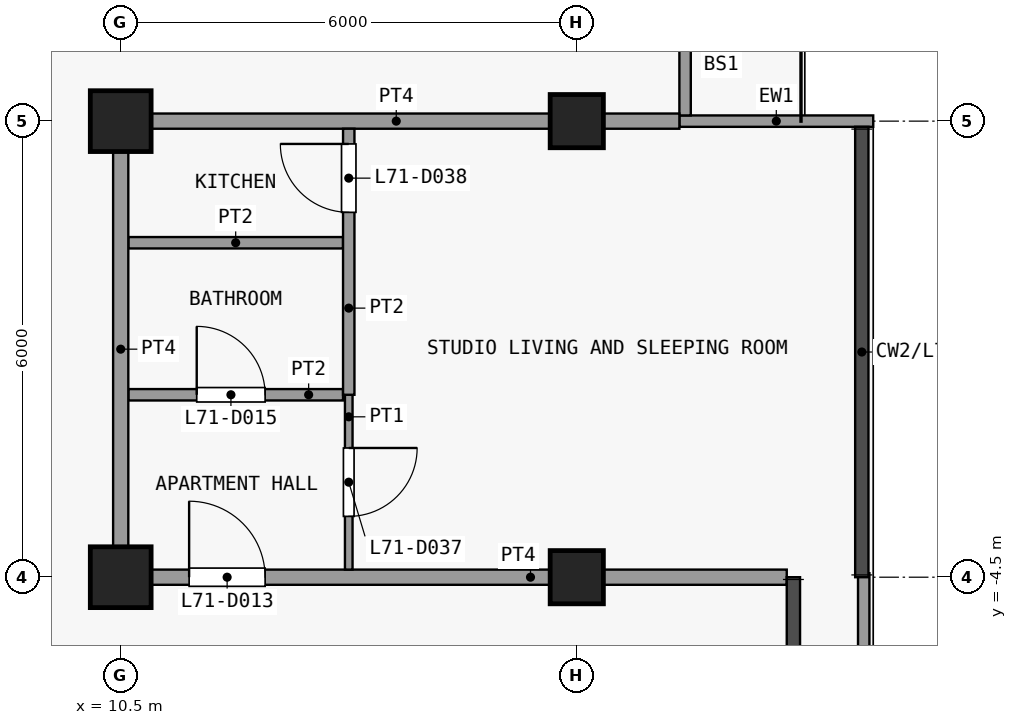
"""IFC4 building model, lengths in metres.
Left out: names, types, materials, properties, quantities, classifications, styles, units other than length and angle.
Written with IfcOpenShell. Run it as: python <this file> out.ifc"""

import sys

from ifc_helpers import new_model, si_unit, direction, frame, frame_2d, origin, origin_2d, place, context, subcontext, project, spatial, rectangle, extrude, element, fill, save


model = new_model("IFC4")
c1 = context("Model", 3, precision=1e-05, world=origin(), true_north=direction((0.0, 1.0)))
c2 = subcontext(c1, "Body", "Model", "MODEL_VIEW")
j1 = project(units=[si_unit("LENGTHUNIT", "METRE"), si_unit("PLANEANGLEUNIT", "RADIAN")], contexts=[c1])
p1 = place(None, origin())
s1 = spatial("IfcSite", under=j1, at=p1, CompositionType="ELEMENT")
p2 = place(p1, origin())
s2 = spatial("IfcBuilding", under=s1, at=p2, CompositionType="ELEMENT")
p3 = place(p2, frame((0.0, 0.0, 280.7)))
s3 = spatial("IfcBuildingStorey", under=s2, at=p3, CompositionType="ELEMENT", Elevation=280.7)
for number, where, z_axis, x_axis in (
    (1, (10.5, -4.5, 0.0), (0.0, 0.0, 1.0), (1.0, 0.0, 0.0)),
    (2, (10.5, 1.5, 0.0), (0.0, 0.0, 1.0), (1.0, 0.0, 0.0)),
):
    element("IfcColumn", number, at=place(p3, frame(where, z_axis=z_axis, x_axis=x_axis)), inside=s3, PredefinedType="COLUMN", context=c2, shape_type="SweptSolid", body=[
        extrude(rectangle(XDim=0.8, YDim=0.8, at=origin_2d()), origin(), (0.0, 0.0, 1.0), 3.6),
    ])
for number, where, z_axis, x_axis in (
    (3, (16.5, -4.5, 0.0), (0.0, 0.0, 1.0), (1.0, 0.0, 0.0)),
    (4, (16.5, 1.5, 0.0), (0.0, 0.0, 1.0), (1.0, 0.0, 0.0)),
):
    element("IfcColumn", number, at=place(p3, frame(where, z_axis=z_axis, x_axis=x_axis)), inside=s3, PredefinedType="COLUMN", context=c2, shape_type="SweptSolid", body=[
        extrude(rectangle(XDim=0.7, YDim=0.7, at=origin_2d()), origin(), (0.0, 0.0, 1.0), 3.6),
    ])
p4 = place(p3, frame((17.85, 1.5, 0.0), z_axis=(0.0, 0.0, 1.0), x_axis=(1.0, 0.0, 0.0)))
e5 = element("IfcWall", 5, at=p4, inside=s3, PredefinedType="SOLIDWALL", context=c2, shape_type="SweptSolid", body=[
    extrude(rectangle(XDim=2.55, YDim=0.15, at=frame_2d((1.275, 0.0))), origin(), (0.0, 0.0, 1.0), 3.3),
])
p5 = place(p3, frame((17.925, 7.425, 0.0), z_axis=(0.0, 0.0, 1.0), x_axis=(0.0, -1.0, 0.0)))
e6 = element("IfcWall", 6, at=p5, inside=s3, PredefinedType="SOLIDWALL", context=c2, shape_type="SweptSolid", body=[
    extrude(rectangle(XDim=5.85, YDim=0.15, at=frame_2d((2.925, 0.0))), origin(), (0.0, 0.0, 1.0), 3.3),
])
p6 = place(p5, frame((1.15, 0.0, 0.0)))
e7 = element("IfcOpeningElement", 7, at=p6, cuts=e6, PredefinedType="OPENING", context=c2, shape_type="SweptSolid", body=[
    extrude(rectangle(XDim=1.2, YDim=2.4, at=frame_2d((0.6, 1.2))), frame((0.0, 0.085, 0.0), z_axis=(0.0, -1.0, 0.0), x_axis=(1.0, 0.0, 0.0)), (0.0, 0.0, 1.0), 0.17),
])
p7 = place(p5, frame((3.2, 0.0, 0.9)))
e8 = element("IfcOpeningElement", 8, at=p7, cuts=e6, PredefinedType="OPENING", context=c2, shape_type="SweptSolid", body=[
    extrude(rectangle(XDim=1.8, YDim=2.1, at=frame_2d((0.9, 1.05))), frame((0.0, 0.085, 0.0), z_axis=(0.0, -1.0, 0.0), x_axis=(1.0, 0.0, 0.0)), (0.0, 0.0, 1.0), 0.17),
])
p8 = place(p3, frame((20.275, -4.448, 0.0), z_axis=(0.0, 0.0, 1.0), x_axis=(0.0, -1.0, 0.0)))
e9 = element("IfcWall", 9, at=p8, inside=s3, PredefinedType="PARAPET", context=c2, shape_type="SweptSolid", body=[
    extrude(rectangle(XDim=9.002, YDim=0.15, at=frame_2d((4.501, 0.0))), origin(), (0.0, 0.0, 1.0), 1.15),
])
p9 = place(p3, frame((10.4, -4.5, 0.0), z_axis=(0.0, 0.0, 1.0), x_axis=(1.0, 0.0, 0.0)))
e10 = element("IfcWall", 10, at=p9, inside=s3, PredefinedType="PARTITIONING", context=c2, shape_type="SweptSolid", body=[
    extrude(rectangle(XDim=8.863, YDim=0.2, at=frame_2d((4.431, 0.0))), origin(), (0.0, 0.0, 1.0), 3.3),
])
p10 = place(p9, frame((1.0, 0.0, 0.0)))
e11 = element("IfcOpeningElement", 11, at=p10, cuts=e10, PredefinedType="OPENING", context=c2, shape_type="SweptSolid", body=[
    extrude(rectangle(XDim=1.0, YDim=2.1, at=frame_2d((0.5, 1.05))), frame((0.0, 0.11, 0.0), z_axis=(0.0, -1.0, 0.0), x_axis=(1.0, 0.0, 0.0)), (0.0, 0.0, 1.0), 0.22),
])
p11 = place(p3, frame((10.6, -2.1, 0.0), z_axis=(0.0, 0.0, 1.0), x_axis=(1.0, 0.0, 0.0)))
e12 = element("IfcWall", 12, at=p11, inside=s3, PredefinedType="PARTITIONING", context=c2, shape_type="SweptSolid", body=[
    extrude(rectangle(XDim=2.825, YDim=0.15, at=frame_2d((1.413, 0.0))), origin(), (0.0, 0.0, 1.0), 3.3),
])
p12 = place(p11, frame((0.9, 0.0, 0.0)))
e13 = element("IfcOpeningElement", 13, at=p12, cuts=e12, PredefinedType="OPENING", context=c2, shape_type="SweptSolid", body=[
    extrude(rectangle(XDim=0.9, YDim=2.1, at=frame_2d((0.45, 1.05))), frame((0.0, 0.085, 0.0), z_axis=(0.0, -1.0, 0.0), x_axis=(1.0, 0.0, 0.0)), (0.0, 0.0, 1.0), 0.17),
])
p13 = place(p3, frame((10.6, -0.1, 0.0), z_axis=(0.0, 0.0, 1.0), x_axis=(1.0, 0.0, 0.0)))
e14 = element("IfcWall", 14, at=p13, inside=s3, PredefinedType="PARTITIONING", context=c2, shape_type="SweptSolid", body=[
    extrude(rectangle(XDim=2.825, YDim=0.15, at=frame_2d((1.413, 0.0))), origin(), (0.0, 0.0, 1.0), 3.3),
])
p14 = place(p3, frame((10.4, 1.5, 0.0), z_axis=(0.0, 0.0, 1.0), x_axis=(1.0, 0.0, 0.0)))
e15 = element("IfcWall", 15, at=p14, inside=s3, PredefinedType="PARTITIONING", context=c2, shape_type="SweptSolid", body=[
    extrude(rectangle(XDim=7.45, YDim=0.2, at=frame_2d((3.725, 0.0))), origin(), (0.0, 0.0, 1.0), 3.3),
])
p15 = place(p3, frame((10.5, -4.4, 0.0), z_axis=(0.0, 0.0, 1.0), x_axis=(0.0, 1.0, 0.0)))
e16 = element("IfcWall", 16, at=p15, inside=s3, PredefinedType="PARTITIONING", context=c2, shape_type="SweptSolid", body=[
    extrude(rectangle(XDim=5.8, YDim=0.2, at=frame_2d((2.9, 0.0))), origin(), (0.0, 0.0, 1.0), 3.3),
])
p16 = place(p3, frame((13.5, -4.4, 0.0), z_axis=(0.0, 0.0, 1.0), x_axis=(0.0, 1.0, 0.0)))
e17 = element("IfcWall", 17, at=p16, inside=s3, PredefinedType="PARTITIONING", context=c2, shape_type="SweptSolid", body=[
    extrude(rectangle(XDim=2.3, YDim=0.1, at=frame_2d((1.15, 0.0))), origin(), (0.0, 0.0, 1.0), 3.3),
])
p17 = place(p16, frame((0.7, 0.0, 0.0)))
e18 = element("IfcOpeningElement", 18, at=p17, cuts=e17, PredefinedType="OPENING", context=c2, shape_type="SweptSolid", body=[
    extrude(rectangle(XDim=0.9, YDim=2.1, at=frame_2d((0.45, 1.05))), frame((0.0, 0.06, 0.0), z_axis=(0.0, -1.0, 0.0), x_axis=(1.0, 0.0, 0.0)), (0.0, 0.0, 1.0), 0.12),
])
p18 = place(p3, frame((13.5, -2.1, 0.0), z_axis=(0.0, 0.0, 1.0), x_axis=(0.0, 1.0, 0.0)))
e19 = element("IfcWall", 19, at=p18, inside=s3, PredefinedType="PARTITIONING", context=c2, shape_type="SweptSolid", body=[
    extrude(rectangle(XDim=3.5, YDim=0.15, at=frame_2d((1.75, 0.0))), origin(), (0.0, 0.0, 1.0), 3.3),
])
p19 = place(p18, frame((2.4, 0.0, 0.0)))
e20 = element("IfcOpeningElement", 20, at=p19, cuts=e19, PredefinedType="OPENING", context=c2, shape_type="SweptSolid", body=[
    extrude(rectangle(XDim=0.9, YDim=2.1, at=frame_2d((0.45, 1.05))), frame((0.0, 0.085, 0.0), z_axis=(0.0, -1.0, 0.0), x_axis=(1.0, 0.0, 0.0)), (0.0, 0.0, 1.0), 0.17),
])
p20 = place(p10, origin())
e21 = element("IfcDoor", 21, at=p20, inside=s3, OperationType="SINGLE_SWING_RIGHT", PredefinedType="DOOR", context=c2, shape_type="SweptSolid", body=[
    extrude(rectangle(XDim=1.0, YDim=2.1, at=frame_2d((0.5, 1.05))), frame((0.0, 0.025, 0.0), z_axis=(0.0, -1.0, 0.0), x_axis=(1.0, 0.0, 0.0)), (0.0, 0.0, 1.0), 0.05),
])
fill(e11, e21)
p21 = place(p12, origin())
e22 = element("IfcDoor", 22, at=p21, inside=s3, OperationType="SINGLE_SWING_RIGHT", PredefinedType="DOOR", context=c2, shape_type="SweptSolid", body=[
    extrude(rectangle(XDim=0.9, YDim=2.1, at=frame_2d((0.45, 1.05))), frame((0.0, 0.025, 0.0), z_axis=(0.0, -1.0, 0.0), x_axis=(1.0, 0.0, 0.0)), (0.0, 0.0, 1.0), 0.05),
])
fill(e13, e22)
p22 = place(p17, origin())
e23 = element("IfcDoor", 23, at=p22, inside=s3, OperationType="SINGLE_SWING_RIGHT", PredefinedType="DOOR", context=c2, shape_type="SweptSolid", body=[
    extrude(rectangle(XDim=0.9, YDim=2.1, at=frame_2d((0.45, 1.05))), frame((0.0, 0.025, 0.0), z_axis=(0.0, -1.0, 0.0), x_axis=(1.0, 0.0, 0.0)), (0.0, 0.0, 1.0), 0.05),
])
fill(e18, e23)
p23 = place(p19, origin())
e24 = element("IfcDoor", 24, at=p23, inside=s3, OperationType="SINGLE_SWING_LEFT", PredefinedType="DOOR", context=c2, shape_type="SweptSolid", body=[
    extrude(rectangle(XDim=0.9, YDim=2.1, at=frame_2d((0.45, 1.05))), frame((0.0, 0.025, 0.0), z_axis=(0.0, -1.0, 0.0), x_axis=(1.0, 0.0, 0.0)), (0.0, 0.0, 1.0), 0.05),
])
fill(e20, e24)
save(model, sys.argv[1])
